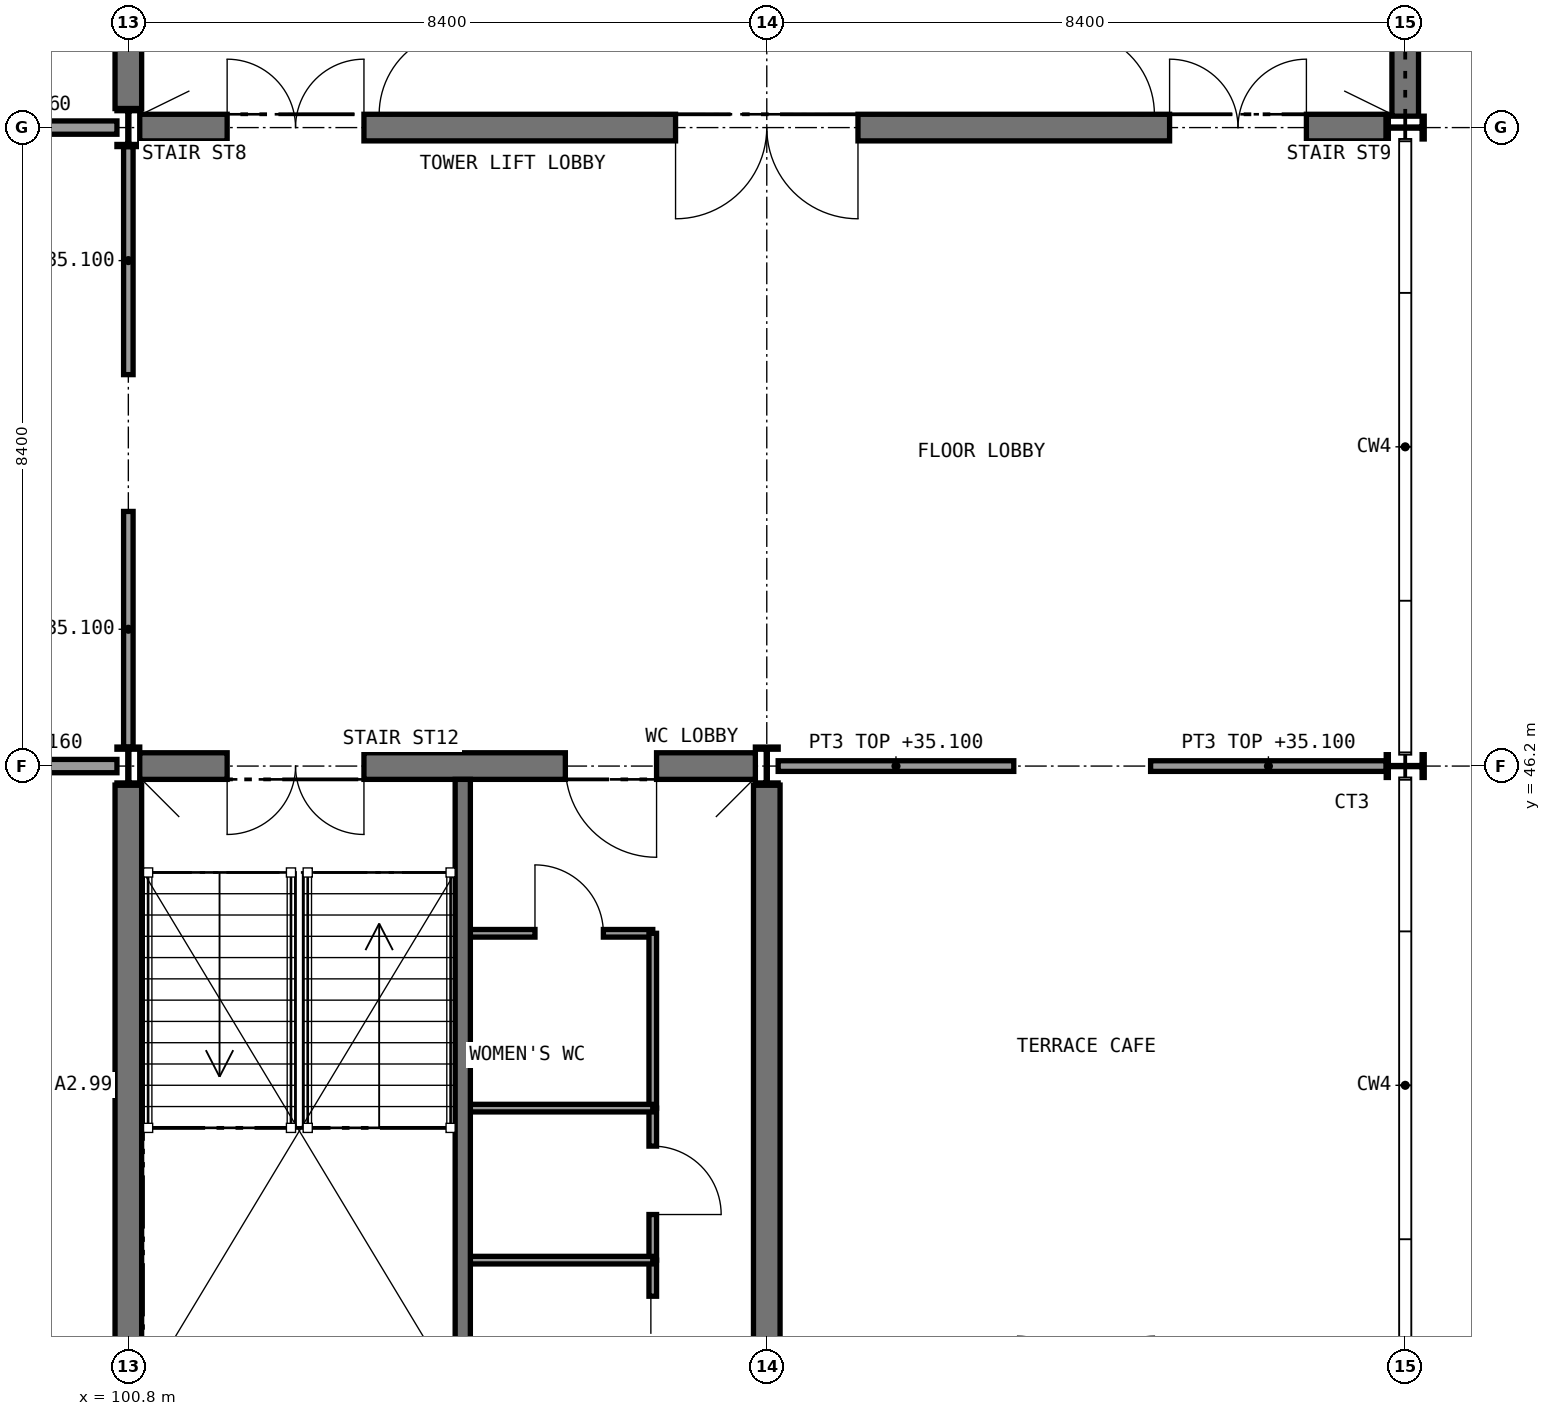
"""IFC4 building model, lengths in metres.
Left out: names, types, materials, properties, quantities, classifications, styles, units other than length and angle.
Written with IfcOpenShell. Run it as: python <this file> out.ifc"""

import sys

from ifc_helpers import new_model, si_unit, direction, frame, frame_2d, origin, origin_2d, place, context, subcontext, project, spatial, rectangle, i_section, extrude, element, fill, save


model = new_model("IFC4")
c1 = context("Model", 3, precision=1e-05, world=origin(), true_north=direction((0.0, 1.0)))
c2 = subcontext(c1, "Body", "Model", "MODEL_VIEW")
j1 = project(units=[si_unit("LENGTHUNIT", "METRE"), si_unit("PLANEANGLEUNIT", "RADIAN")], contexts=[c1])
p1 = place(None, origin())
s1 = spatial("IfcSite", under=j1, at=p1, CompositionType="ELEMENT")
p2 = place(p1, origin())
s2 = spatial("IfcBuilding", under=s1, at=p2, CompositionType="ELEMENT")
p3 = place(p2, frame((0.0, 0.0, 31.2)))
s3 = spatial("IfcBuildingStorey", under=s2, at=p3, CompositionType="ELEMENT", Elevation=31.2)
p4 = place(p3, frame((100.95, 54.6, 0.0), z_axis=(0.0, 0.0, 1.0), x_axis=(1.0, 0.0, 0.0)))
e1 = element("IfcWall", 1, at=p4, inside=s3, PredefinedType="SHEAR", context=c2, shape_type="SweptSolid", body=[
    extrude(rectangle(XDim=16.4, YDim=0.35, at=frame_2d((8.2, 0.0))), origin(), (0.0, 0.0, 1.0), 4.25),
])
p5 = place(p4, frame((1.15, 0.0, 0.0)))
e2 = element("IfcOpeningElement", 2, at=p5, cuts=e1, PredefinedType="OPENING", context=c2, shape_type="SweptSolid", body=[
    extrude(rectangle(XDim=1.8, YDim=2.1, at=frame_2d((0.9, 1.05))), frame((0.0, 0.185, 0.0), z_axis=(0.0, -1.0, 0.0), x_axis=(1.0, 0.0, 0.0)), (0.0, 0.0, 1.0), 0.37),
])
p6 = place(p4, frame((13.55, 0.0, 0.0)))
e3 = element("IfcOpeningElement", 3, at=p6, cuts=e1, PredefinedType="OPENING", context=c2, shape_type="SweptSolid", body=[
    extrude(rectangle(XDim=1.8, YDim=2.1, at=frame_2d((0.9, 1.05))), frame((0.0, 0.185, 0.0), z_axis=(0.0, -1.0, 0.0), x_axis=(1.0, 0.0, 0.0)), (0.0, 0.0, 1.0), 0.37),
])
p7 = place(p4, frame((7.05, 0.0, 0.0)))
e4 = element("IfcOpeningElement", 4, at=p7, cuts=e1, PredefinedType="OPENING", context=c2, shape_type="SweptSolid", body=[
    extrude(rectangle(XDim=2.4, YDim=2.4, at=frame_2d((1.2, 1.2))), frame((0.0, 0.185, 0.0), z_axis=(0.0, -1.0, 0.0), x_axis=(1.0, 0.0, 0.0)), (0.0, 0.0, 1.0), 0.37),
])
p8 = place(p3, frame((100.8, 54.85, 0.0), z_axis=(0.0, 0.0, 1.0), x_axis=(0.0, 1.0, 0.0)))
e5 = element("IfcWall", 5, at=p8, inside=s3, PredefinedType="SHEAR", context=c2, shape_type="SweptSolid", body=[
    extrude(rectangle(XDim=7.9, YDim=0.35, at=frame_2d((3.95, 0.0))), origin(), (0.0, 0.0, 1.0), 4.25),
])
p9 = place(p3, frame((117.6, 54.75, 0.0), z_axis=(0.0, 0.0, 1.0), x_axis=(0.0, 1.0, 0.0)))
e6 = element("IfcWall", 6, at=p9, inside=s3, PredefinedType="SHEAR", context=c2, shape_type="SweptSolid", body=[
    extrude(rectangle(XDim=8.1, YDim=0.35, at=frame_2d((4.05, 0.0))), origin(), (0.0, 0.0, 1.0), 4.25),
])
p10 = place(p3, frame((100.95, 46.2, 0.0), z_axis=(0.0, 0.0, 1.0), x_axis=(1.0, 0.0, 0.0)))
e7 = element("IfcWall", 7, at=p10, inside=s3, PredefinedType="SHEAR", context=c2, shape_type="SweptSolid", body=[
    extrude(rectangle(XDim=8.1, YDim=0.35, at=frame_2d((4.05, 0.0))), origin(), (0.0, 0.0, 1.0), 4.25),
])
p11 = place(p10, frame((1.15, 0.0, 0.0)))
e8 = element("IfcOpeningElement", 8, at=p11, cuts=e7, PredefinedType="OPENING", context=c2, shape_type="SweptSolid", body=[
    extrude(rectangle(XDim=1.8, YDim=2.1, at=frame_2d((0.9, 1.05))), frame((0.0, 0.185, 0.0), z_axis=(0.0, -1.0, 0.0), x_axis=(1.0, 0.0, 0.0)), (0.0, 0.0, 1.0), 0.37),
])
p12 = place(p10, frame((5.6, 0.0, 0.0)))
e9 = element("IfcOpeningElement", 9, at=p12, cuts=e7, PredefinedType="OPENING", context=c2, shape_type="SweptSolid", body=[
    extrude(rectangle(XDim=1.2, YDim=2.1, at=frame_2d((0.6, 1.05))), frame((0.0, 0.185, 0.0), z_axis=(0.0, -1.0, 0.0), x_axis=(1.0, 0.0, 0.0)), (0.0, 0.0, 1.0), 0.37),
])
for number, where, z_axis, x_axis in (
    (10, (100.8, 38.05, 0.0), (0.0, 0.0, 1.0), (0.0, 1.0, 0.0)),
    (11, (109.2, 38.05, 0.0), (0.0, 0.0, 1.0), (0.0, 1.0, 0.0)),
):
    element("IfcWall", number, at=place(p3, frame(where, z_axis=z_axis, x_axis=x_axis)), inside=s3, PredefinedType="SHEAR", context=c2, shape_type="SweptSolid", body=[
        extrude(rectangle(XDim=7.9, YDim=0.35, at=frame_2d((3.95, 0.0))), origin(), (0.0, 0.0, 1.0), 4.25),
    ])
for number, where, z_axis, x_axis in (
    (12, (100.8, 46.2, 0.0), (0.0, 0.0, 1.0), (1.0, 0.0, 0.0)),
    (13, (100.8, 54.6, 0.0), (0.0, 0.0, 1.0), (1.0, 0.0, 0.0)),
    (14, (109.2, 46.2, 0.0), (0.0, 0.0, 1.0), (1.0, 0.0, 0.0)),
    (15, (117.6, 46.2, 0.0), (0.0, 0.0, 1.0), (0.0, 1.0, 0.0)),
    (16, (117.6, 54.6, 0.0), (0.0, 0.0, 1.0), (0.0, 1.0, 0.0)),
):
    element("IfcColumn", number, at=place(p3, frame(where, z_axis=z_axis, x_axis=x_axis)), inside=s3, PredefinedType="COLUMN", context=c2, shape_type="SweptSolid", body=[
        extrude(i_section(OverallWidth=0.3, OverallDepth=0.5, WebThickness=0.014, FlangeThickness=0.028, FilletRadius=0.027, at=origin_2d()), origin(), (0.0, 0.0, 1.0), 4.4),
    ])
p13 = place(p3, frame((105.3, 44.0, 0.0), z_axis=(0.0, 0.0, 1.0), x_axis=(1.0, 0.0, 0.0)))
e17 = element("IfcWall", 17, at=p13, inside=s3, PredefinedType="PARTITIONING", context=c2, shape_type="SweptSolid", body=[
    extrude(rectangle(XDim=2.4, YDim=0.1, at=frame_2d((1.2, 0.0))), origin(), (0.0, 0.0, 1.0), 4.18),
])
p14 = place(p13, frame((0.85, 0.0, 0.0)))
e18 = element("IfcOpeningElement", 18, at=p14, cuts=e17, PredefinedType="OPENING", context=c2, shape_type="SweptSolid", body=[
    extrude(rectangle(XDim=0.9, YDim=2.1, at=frame_2d((0.45, 1.05))), frame((0.0, 0.06, 0.0), z_axis=(0.0, -1.0, 0.0), x_axis=(1.0, 0.0, 0.0)), (0.0, 0.0, 1.0), 0.12),
])
p15 = place(p3, frame((107.7, 41.7, 0.0), z_axis=(0.0, 0.0, 1.0), x_axis=(0.0, 1.0, 0.0)))
e19 = element("IfcWall", 19, at=p15, inside=s3, PredefinedType="PARTITIONING", context=c2, shape_type="SweptSolid", body=[
    extrude(rectangle(XDim=2.3, YDim=0.1, at=frame_2d((1.15, 0.0))), origin(), (0.0, 0.0, 1.0), 4.18),
])
p16 = place(p3, frame((107.7, 39.7, 0.0), z_axis=(0.0, 0.0, 1.0), x_axis=(0.0, 1.0, 0.0)))
e20 = element("IfcWall", 20, at=p16, inside=s3, PredefinedType="PARTITIONING", context=c2, shape_type="SweptSolid", body=[
    extrude(rectangle(XDim=2.0, YDim=0.1, at=frame_2d((1.0, 0.0))), origin(), (0.0, 0.0, 1.0), 4.18),
])
p17 = place(p16, frame((0.6, 0.0, 0.0)))
e21 = element("IfcOpeningElement", 21, at=p17, cuts=e20, PredefinedType="OPENING", context=c2, shape_type="SweptSolid", body=[
    extrude(rectangle(XDim=0.9, YDim=2.1, at=frame_2d((0.45, 1.05))), frame((0.0, 0.06, 0.0), z_axis=(0.0, -1.0, 0.0), x_axis=(1.0, 0.0, 0.0)), (0.0, 0.0, 1.0), 0.12),
])
p18 = place(p3, frame((107.7, 37.975, 0.0), z_axis=(0.0, 0.0, 1.0), x_axis=(0.0, 1.0, 0.0)))
e22 = element("IfcWall", 22, at=p18, inside=s3, PredefinedType="PARTITIONING", context=c2, shape_type="SweptSolid", body=[
    extrude(rectangle(XDim=1.725, YDim=0.1, at=frame_2d((0.862, 0.0))), origin(), (0.0, 0.0, 1.0), 4.18),
])
p19 = place(p18, frame((0.35, 0.0, 0.0)))
e23 = element("IfcOpeningElement", 23, at=p19, cuts=e22, PredefinedType="OPENING", context=c2, shape_type="SweptSolid", body=[
    extrude(rectangle(XDim=0.9, YDim=2.1, at=frame_2d((0.45, 1.05))), frame((0.0, 0.06, 0.0), z_axis=(0.0, -1.0, 0.0), x_axis=(1.0, 0.0, 0.0)), (0.0, 0.0, 1.0), 0.12),
])
for number, where, z_axis, x_axis in (
    (24, (105.3, 41.7, 0.0), (0.0, 0.0, 1.0), (1.0, 0.0, 0.0)),
    (25, (105.3, 39.7, 0.0), (0.0, 0.0, 1.0), (1.0, 0.0, 0.0)),
):
    element("IfcWall", number, at=place(p3, frame(where, z_axis=z_axis, x_axis=x_axis)), inside=s3, PredefinedType="PARTITIONING", context=c2, shape_type="SweptSolid", body=[
        extrude(rectangle(XDim=2.4, YDim=0.1, at=frame_2d((1.2, 0.0))), origin(), (0.0, 0.0, 1.0), 4.18),
    ])
p20 = place(p3, frame((92.55, 46.2, 0.0), z_axis=(0.0, 0.0, 1.0), x_axis=(1.0, 0.0, 0.0)))
e26 = element("IfcWall", 26, at=p20, inside=s3, PredefinedType="PARTITIONING", context=c2, shape_type="SweptSolid", body=[
    extrude(rectangle(XDim=8.1, YDim=0.175, at=frame_2d((4.05, 0.0))), origin(), (0.0, 0.0, 1.0), 3.96),
])
p21 = place(p20, frame((3.1, 0.0, 0.0)))
e27 = element("IfcOpeningElement", 27, at=p21, cuts=e26, PredefinedType="OPENING", context=c2, shape_type="SweptSolid", body=[
    extrude(rectangle(XDim=1.8, YDim=2.1, at=frame_2d((0.9, 1.05))), frame((0.0, 0.098, 0.0), z_axis=(0.0, -1.0, 0.0), x_axis=(1.0, 0.0, 0.0)), (0.0, 0.0, 1.0), 0.195),
])
for number, where, z_axis, x_axis in (
    (28, (109.35, 46.2, 0.0), (0.0, 0.0, 1.0), (1.0, 0.0, 0.0)),
    (29, (114.25, 46.2, 0.0), (0.0, 0.0, 1.0), (1.0, 0.0, 0.0)),
):
    element("IfcWall", number, at=place(p3, frame(where, z_axis=z_axis, x_axis=x_axis)), inside=s3, PredefinedType="PARTITIONING", context=c2, shape_type="SweptSolid", body=[
        extrude(rectangle(XDim=3.1, YDim=0.14, at=frame_2d((1.55, 0.0))), origin(), (0.0, 0.0, 1.0), 3.9),
    ])
p22 = place(p3, frame((100.8, 46.45, 0.0), z_axis=(0.0, 0.0, 1.0), x_axis=(0.0, 1.0, 0.0)))
e30 = element("IfcWall", 30, at=p22, inside=s3, PredefinedType="PARTITIONING", context=c2, shape_type="SweptSolid", body=[
    extrude(rectangle(XDim=3.1, YDim=0.125, at=frame_2d((1.55, 0.0))), origin(), (0.0, 0.0, 1.0), 3.9),
])
p23 = place(p3, frame((100.8, 51.35, 0.0), z_axis=(0.0, 0.0, 1.0), x_axis=(0.0, 1.0, 0.0)))
e31 = element("IfcWall", 31, at=p23, inside=s3, PredefinedType="PARTITIONING", context=c2, shape_type="SweptSolid", body=[
    extrude(rectangle(XDim=3.0, YDim=0.125, at=frame_2d((1.5, 0.0))), origin(), (0.0, 0.0, 1.0), 3.9),
])
p24 = place(p3, frame((92.55, 54.6, 0.0), z_axis=(0.0, 0.0, 1.0), x_axis=(1.0, 0.0, 0.0)))
e32 = element("IfcWall", 32, at=p24, inside=s3, PredefinedType="PARTITIONING", context=c2, shape_type="SweptSolid", body=[
    extrude(rectangle(XDim=8.1, YDim=0.175, at=frame_2d((4.05, 0.0))), origin(), (0.0, 0.0, 1.0), 3.96),
])
p25 = place(p24, frame((3.6, 0.0, 0.0)))
e33 = element("IfcOpeningElement", 33, at=p25, cuts=e32, PredefinedType="OPENING", context=c2, shape_type="SweptSolid", body=[
    extrude(rectangle(XDim=1.0, YDim=2.1, at=frame_2d((0.5, 1.05))), frame((0.0, 0.098, 0.0), z_axis=(0.0, -1.0, 0.0), x_axis=(1.0, 0.0, 0.0)), (0.0, 0.0, 1.0), 0.195),
])
p26 = place(p3, frame((105.2, 62.825, 0.0), z_axis=(0.0, 0.0, 1.0), x_axis=(0.0, -1.0, 0.0)))
e34 = element("IfcWall", 34, at=p26, inside=s3, PredefinedType="SHEAR", context=c2, shape_type="SweptSolid", body=[
    extrude(rectangle(XDim=8.05, YDim=0.2, at=frame_2d((4.025, 0.0))), origin(), (0.0, 0.0, 1.0), 4.25),
])
p27 = place(p26, frame((6.95, 0.0, 0.0)))
e35 = element("IfcOpeningElement", 35, at=p27, cuts=e34, PredefinedType="OPENING", context=c2, shape_type="SweptSolid", body=[
    extrude(rectangle(XDim=1.11, YDim=2.1, at=frame_2d((0.555, 1.05))), frame((0.0, 0.11, 0.0), z_axis=(0.0, -1.0, 0.0), x_axis=(1.0, 0.0, 0.0)), (0.0, 0.0, 1.0), 0.22),
])
p28 = place(p3, frame((113.2, 62.825, 0.0), z_axis=(0.0, 0.0, 1.0), x_axis=(0.0, -1.0, 0.0)))
e36 = element("IfcWall", 36, at=p28, inside=s3, PredefinedType="SHEAR", context=c2, shape_type="SweptSolid", body=[
    extrude(rectangle(XDim=8.05, YDim=0.2, at=frame_2d((4.025, 0.0))), origin(), (0.0, 0.0, 1.0), 4.25),
])
p29 = place(p28, frame((6.95, 0.0, 0.0)))
e37 = element("IfcOpeningElement", 37, at=p29, cuts=e36, PredefinedType="OPENING", context=c2, shape_type="SweptSolid", body=[
    extrude(rectangle(XDim=1.11, YDim=2.1, at=frame_2d((0.555, 1.05))), frame((0.0, 0.11, 0.0), z_axis=(0.0, -1.0, 0.0), x_axis=(1.0, 0.0, 0.0)), (0.0, 0.0, 1.0), 0.22),
])
p30 = place(p3, frame((105.2, 37.975, 0.0), z_axis=(0.0, 0.0, 1.0), x_axis=(0.0, 1.0, 0.0)))
e38 = element("IfcWall", 38, at=p30, inside=s3, PredefinedType="SHEAR", context=c2, shape_type="SweptSolid", body=[
    extrude(rectangle(XDim=8.05, YDim=0.2, at=frame_2d((4.025, 0.0))), origin(), (0.0, 0.0, 1.0), 4.25),
])
p31 = place(p14, origin())
e39 = element("IfcDoor", 39, at=p31, inside=s3, OperationType="SINGLE_SWING_LEFT", PredefinedType="DOOR", context=c2, shape_type="SweptSolid", body=[
    extrude(rectangle(XDim=0.9, YDim=2.1, at=frame_2d((0.45, 1.05))), frame((0.0, 0.025, 0.0), z_axis=(0.0, -1.0, 0.0), x_axis=(1.0, 0.0, 0.0)), (0.0, 0.0, 1.0), 0.05),
])
fill(e18, e39)
p32 = place(p17, frame((0.9, 0.0, 0.0), z_axis=(0.0, 0.0, 1.0), x_axis=(-1.0, 0.0, 0.0)))
e40 = element("IfcDoor", 40, at=p32, inside=s3, OperationType="SINGLE_SWING_RIGHT", PredefinedType="DOOR", context=c2, shape_type="SweptSolid", body=[
    extrude(rectangle(XDim=0.9, YDim=2.1, at=frame_2d((0.45, 1.05))), frame((0.0, 0.025, 0.0), z_axis=(0.0, -1.0, 0.0), x_axis=(1.0, 0.0, 0.0)), (0.0, 0.0, 1.0), 0.05),
])
fill(e21, e40)
p33 = place(p19, origin())
e41 = element("IfcDoor", 41, at=p33, inside=s3, OperationType="SLIDING_TO_RIGHT", PredefinedType="DOOR", context=c2, shape_type="SweptSolid", body=[
    extrude(rectangle(XDim=0.9, YDim=2.1, at=frame_2d((0.45, 1.05))), frame((0.0, 0.025, 0.0), z_axis=(0.0, -1.0, 0.0), x_axis=(1.0, 0.0, 0.0)), (0.0, 0.0, 1.0), 0.05),
])
fill(e23, e41)
p34 = place(p27, frame((1.1, 0.0, 0.0), z_axis=(0.0, 0.0, 1.0), x_axis=(-1.0, 0.0, 0.0)))
e42 = element("IfcDoor", 42, at=p34, inside=s3, OperationType="SINGLE_SWING_LEFT", PredefinedType="DOOR", context=c2, shape_type="SweptSolid", body=[
    extrude(rectangle(XDim=1.1, YDim=2.1, at=frame_2d((0.55, 1.05))), frame((0.0, 0.025, 0.0), z_axis=(0.0, -1.0, 0.0), x_axis=(1.0, 0.0, 0.0)), (0.0, 0.0, 1.0), 0.05),
])
fill(e35, e42)
p35 = place(p29, origin())
e43 = element("IfcDoor", 43, at=p35, inside=s3, OperationType="SINGLE_SWING_RIGHT", PredefinedType="DOOR", context=c2, shape_type="SweptSolid", body=[
    extrude(rectangle(XDim=1.1, YDim=2.1, at=frame_2d((0.55, 1.05))), frame((0.0, 0.025, 0.0), z_axis=(0.0, -1.0, 0.0), x_axis=(1.0, 0.0, 0.0)), (0.0, 0.0, 1.0), 0.05),
])
fill(e37, e43)
p36 = place(p5, origin())
e44 = element("IfcDoor", 44, at=p36, inside=s3, OperationType="DOUBLE_DOOR_SINGLE_SWING", PredefinedType="DOOR", context=c2, shape_type="SweptSolid", body=[
    extrude(rectangle(XDim=1.8, YDim=2.1, at=frame_2d((0.9, 1.05))), frame((0.0, 0.025, 0.0), z_axis=(0.0, -1.0, 0.0), x_axis=(1.0, 0.0, 0.0)), (0.0, 0.0, 1.0), 0.05),
])
fill(e2, e44)
p37 = place(p6, origin())
e45 = element("IfcDoor", 45, at=p37, inside=s3, OperationType="DOUBLE_DOOR_SINGLE_SWING", PredefinedType="DOOR", context=c2, shape_type="SweptSolid", body=[
    extrude(rectangle(XDim=1.8, YDim=2.1, at=frame_2d((0.9, 1.05))), frame((0.0, 0.025, 0.0), z_axis=(0.0, -1.0, 0.0), x_axis=(1.0, 0.0, 0.0)), (0.0, 0.0, 1.0), 0.05),
])
fill(e3, e45)
p38 = place(p7, frame((2.4, 0.0, 0.0), z_axis=(0.0, 0.0, 1.0), x_axis=(-1.0, 0.0, 0.0)))
e46 = element("IfcDoor", 46, at=p38, inside=s3, OperationType="DOUBLE_DOOR_SINGLE_SWING", PredefinedType="DOOR", context=c2, shape_type="SweptSolid", body=[
    extrude(rectangle(XDim=2.4, YDim=2.4, at=frame_2d((1.2, 1.2))), frame((0.0, 0.025, 0.0), z_axis=(0.0, -1.0, 0.0), x_axis=(1.0, 0.0, 0.0)), (0.0, 0.0, 1.0), 0.05),
])
fill(e4, e46)
p39 = place(p11, frame((1.8, 0.0, 0.0), z_axis=(0.0, 0.0, 1.0), x_axis=(-1.0, 0.0, 0.0)))
e47 = element("IfcDoor", 47, at=p39, inside=s3, OperationType="DOUBLE_DOOR_SINGLE_SWING", PredefinedType="DOOR", context=c2, shape_type="SweptSolid", body=[
    extrude(rectangle(XDim=1.8, YDim=2.1, at=frame_2d((0.9, 1.05))), frame((0.0, 0.025, 0.0), z_axis=(0.0, -1.0, 0.0), x_axis=(1.0, 0.0, 0.0)), (0.0, 0.0, 1.0), 0.05),
])
fill(e8, e47)
p40 = place(p12, frame((1.2, 0.0, 0.0), z_axis=(0.0, 0.0, 1.0), x_axis=(-1.0, 0.0, 0.0)))
e48 = element("IfcDoor", 48, at=p40, inside=s3, OperationType="SINGLE_SWING_LEFT", PredefinedType="DOOR", context=c2, shape_type="SweptSolid", body=[
    extrude(rectangle(XDim=1.2, YDim=2.1, at=frame_2d((0.6, 1.05))), frame((0.0, 0.025, 0.0), z_axis=(0.0, -1.0, 0.0), x_axis=(1.0, 0.0, 0.0)), (0.0, 0.0, 1.0), 0.05),
])
fill(e9, e48)
save(model, sys.argv[1])
